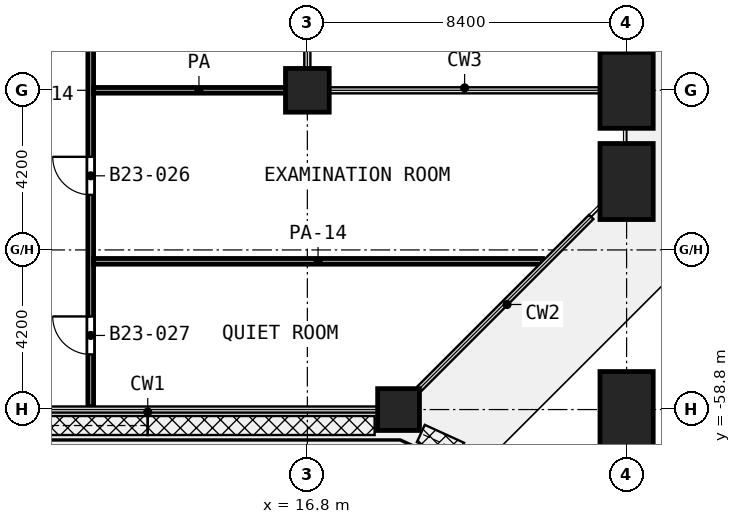
"""IFC4 building model, lengths in metres.
Left out: names, types, materials, properties, quantities, classifications, styles, units other than length and angle.
Written with IfcOpenShell. Run it as: python <this file> out.ifc"""

import sys

from ifc_helpers import new_model, si_unit, direction, frame, frame_2d, origin, origin_2d, place, context, subcontext, project, spatial, rectangle, extrude, element, fill, save


model = new_model("IFC4")
c1 = context("Model", 3, precision=1e-05, world=origin(), true_north=direction((0.0, 1.0)))
c2 = subcontext(c1, "Body", "Model", "MODEL_VIEW")
j1 = project(units=[si_unit("LENGTHUNIT", "METRE"), si_unit("PLANEANGLEUNIT", "RADIAN")], contexts=[c1])
p1 = place(None, origin())
s1 = spatial("IfcSite", under=j1, at=p1, CompositionType="ELEMENT")
p2 = place(p1, origin())
s2 = spatial("IfcBuilding", under=s1, at=p2, CompositionType="ELEMENT")
p3 = place(p2, frame((0.0, 0.0, 103.0)))
s3 = spatial("IfcBuildingStorey", under=s2, at=p3, CompositionType="ELEMENT", Elevation=103.0)
p4 = place(p3, frame((16.8, -50.4, 0.0), z_axis=(0.0, 0.0, 1.0), x_axis=(1.0, 0.0, 0.0)))
e1 = element("IfcColumn", 1, at=p4, inside=s3, PredefinedType="COLUMN", context=c2, shape_type="SweptSolid", body=[
    extrude(rectangle(XDim=1.15, YDim=1.15, at=origin_2d()), origin(), (0.0, 0.0, 1.0), 4.2),
])
p5 = place(p3, frame((25.2, -52.8, 0.0), z_axis=(0.0, 0.0, 1.0), x_axis=(0.0, -1.0, 0.0)))
e2 = element("IfcColumn", 2, at=p5, inside=s3, PredefinedType="COLUMN", context=c2, shape_type="SweptSolid", body=[
    extrude(rectangle(XDim=2.0, YDim=1.4, at=origin_2d()), origin(), (0.0, 0.0, 1.0), 4.2),
])
p6 = place(p3, frame((19.2, -58.8, 0.0), z_axis=(0.0, 0.0, 1.0), x_axis=(1.0, 0.0, 0.0)))
e3 = element("IfcColumn", 3, at=p6, inside=s3, PredefinedType="COLUMN", context=c2, shape_type="SweptSolid", body=[
    extrude(rectangle(XDim=1.1, YDim=1.1, at=origin_2d()), origin(), (0.0, 0.0, 1.0), 4.2),
])
for number, where, z_axis, x_axis in (
    (4, (25.2, -58.8, 0.0), (0.0, 0.0, 1.0), (0.0, -1.0, 0.0)),
    (5, (25.2, -50.4, 0.0), (0.0, 0.0, 1.0), (0.0, -1.0, 0.0)),
):
    element("IfcColumn", number, at=place(p3, frame(where, z_axis=z_axis, x_axis=x_axis)), inside=s3, PredefinedType="COLUMN", context=c2, shape_type="SweptSolid", body=[
        extrude(rectangle(XDim=2.0, YDim=1.4, at=origin_2d()), origin(), (0.0, 0.0, 1.0), 4.2),
    ])
p7 = place(p3, frame((11.175, -54.9, 0.0), z_axis=(0.0, 0.0, 1.0), x_axis=(1.0, 0.0, 0.0)))
e6 = element("IfcWall", 6, at=p7, inside=s3, PredefinedType="PARTITIONING", context=c2, shape_type="SweptSolid", body=[
    extrude(rectangle(XDim=11.812, YDim=0.15, at=frame_2d((5.906, 0.0))), origin(), (0.0, 0.0, 1.0), 2.7),
])
p8 = place(p3, frame((11.175, -50.4, 0.0), z_axis=(0.0, 0.0, 1.0), x_axis=(1.0, 0.0, 0.0)))
e7 = element("IfcWall", 7, at=p8, inside=s3, PredefinedType="PARTITIONING", context=c2, shape_type="SweptSolid", body=[
    extrude(rectangle(XDim=5.545, YDim=0.15, at=frame_2d((2.772, 0.0))), origin(), (0.0, 0.0, 1.0), 3.6),
])
p9 = place(p3, frame((11.1, -58.72, 0.0), z_axis=(0.0, 0.0, 1.0), x_axis=(0.0, 1.0, 0.0)))
e8 = element("IfcWall", 8, at=p9, inside=s3, PredefinedType="PARTITIONING", context=c2, shape_type="SweptSolid", body=[
    extrude(rectangle(XDim=29.32, YDim=0.15, at=frame_2d((14.66, 0.0))), origin(), (0.0, 0.0, 1.0), 2.7),
])
p10 = place(p9, frame((20.17, 0.0, 0.0)))
e9 = element("IfcOpeningElement", 9, at=p10, cuts=e8, PredefinedType="OPENING", context=c2, shape_type="SweptSolid", body=[
    extrude(rectangle(XDim=1.5, YDim=2.1, at=frame_2d((0.75, 1.05))), frame((0.0, 0.085, 0.0), z_axis=(0.0, -1.0, 0.0), x_axis=(1.0, 0.0, 0.0)), (0.0, 0.0, 1.0), 0.17),
])
p11 = place(p9, frame((9.92, 0.0, 0.0)))
e10 = element("IfcOpeningElement", 10, at=p11, cuts=e8, PredefinedType="OPENING", context=c2, shape_type="SweptSolid", body=[
    extrude(rectangle(XDim=1.0, YDim=2.1, at=frame_2d((0.5, 1.05))), frame((0.0, 0.085, 0.0), z_axis=(0.0, -1.0, 0.0), x_axis=(1.0, 0.0, 0.0)), (0.0, 0.0, 1.0), 0.17),
])
p12 = place(p9, frame((5.57, 0.0, 0.0)))
e11 = element("IfcOpeningElement", 11, at=p12, cuts=e8, PredefinedType="OPENING", context=c2, shape_type="SweptSolid", body=[
    extrude(rectangle(XDim=1.0, YDim=2.1, at=frame_2d((0.5, 1.05))), frame((0.0, 0.085, 0.0), z_axis=(0.0, -1.0, 0.0), x_axis=(1.0, 0.0, 0.0)), (0.0, 0.0, 1.0), 0.17),
])
p13 = place(p9, frame((1.37, 0.0, 0.0)))
e12 = element("IfcOpeningElement", 12, at=p13, cuts=e8, PredefinedType="OPENING", context=c2, shape_type="SweptSolid", body=[
    extrude(rectangle(XDim=1.0, YDim=2.1, at=frame_2d((0.5, 1.05))), frame((0.0, 0.085, 0.0), z_axis=(0.0, -1.0, 0.0), x_axis=(1.0, 0.0, 0.0)), (0.0, 0.0, 1.0), 0.17),
])
p14 = place(p12, origin())
e13 = element("IfcDoor", 13, at=p14, inside=s3, OperationType="SINGLE_SWING_RIGHT", PredefinedType="DOOR", context=c2, shape_type="SweptSolid", body=[
    extrude(rectangle(XDim=1.0, YDim=2.1, at=frame_2d((0.5, 1.05))), frame((0.0, 0.025, 0.0), z_axis=(0.0, -1.0, 0.0), x_axis=(1.0, 0.0, 0.0)), (0.0, 0.0, 1.0), 0.05),
])
fill(e11, e13)
p15 = place(p13, origin())
e14 = element("IfcDoor", 14, at=p15, inside=s3, OperationType="SINGLE_SWING_RIGHT", PredefinedType="DOOR", context=c2, shape_type="SweptSolid", body=[
    extrude(rectangle(XDim=1.0, YDim=2.1, at=frame_2d((0.5, 1.05))), frame((0.0, 0.025, 0.0), z_axis=(0.0, -1.0, 0.0), x_axis=(1.0, 0.0, 0.0)), (0.0, 0.0, 1.0), 0.05),
])
fill(e12, e14)
save(model, sys.argv[1])
